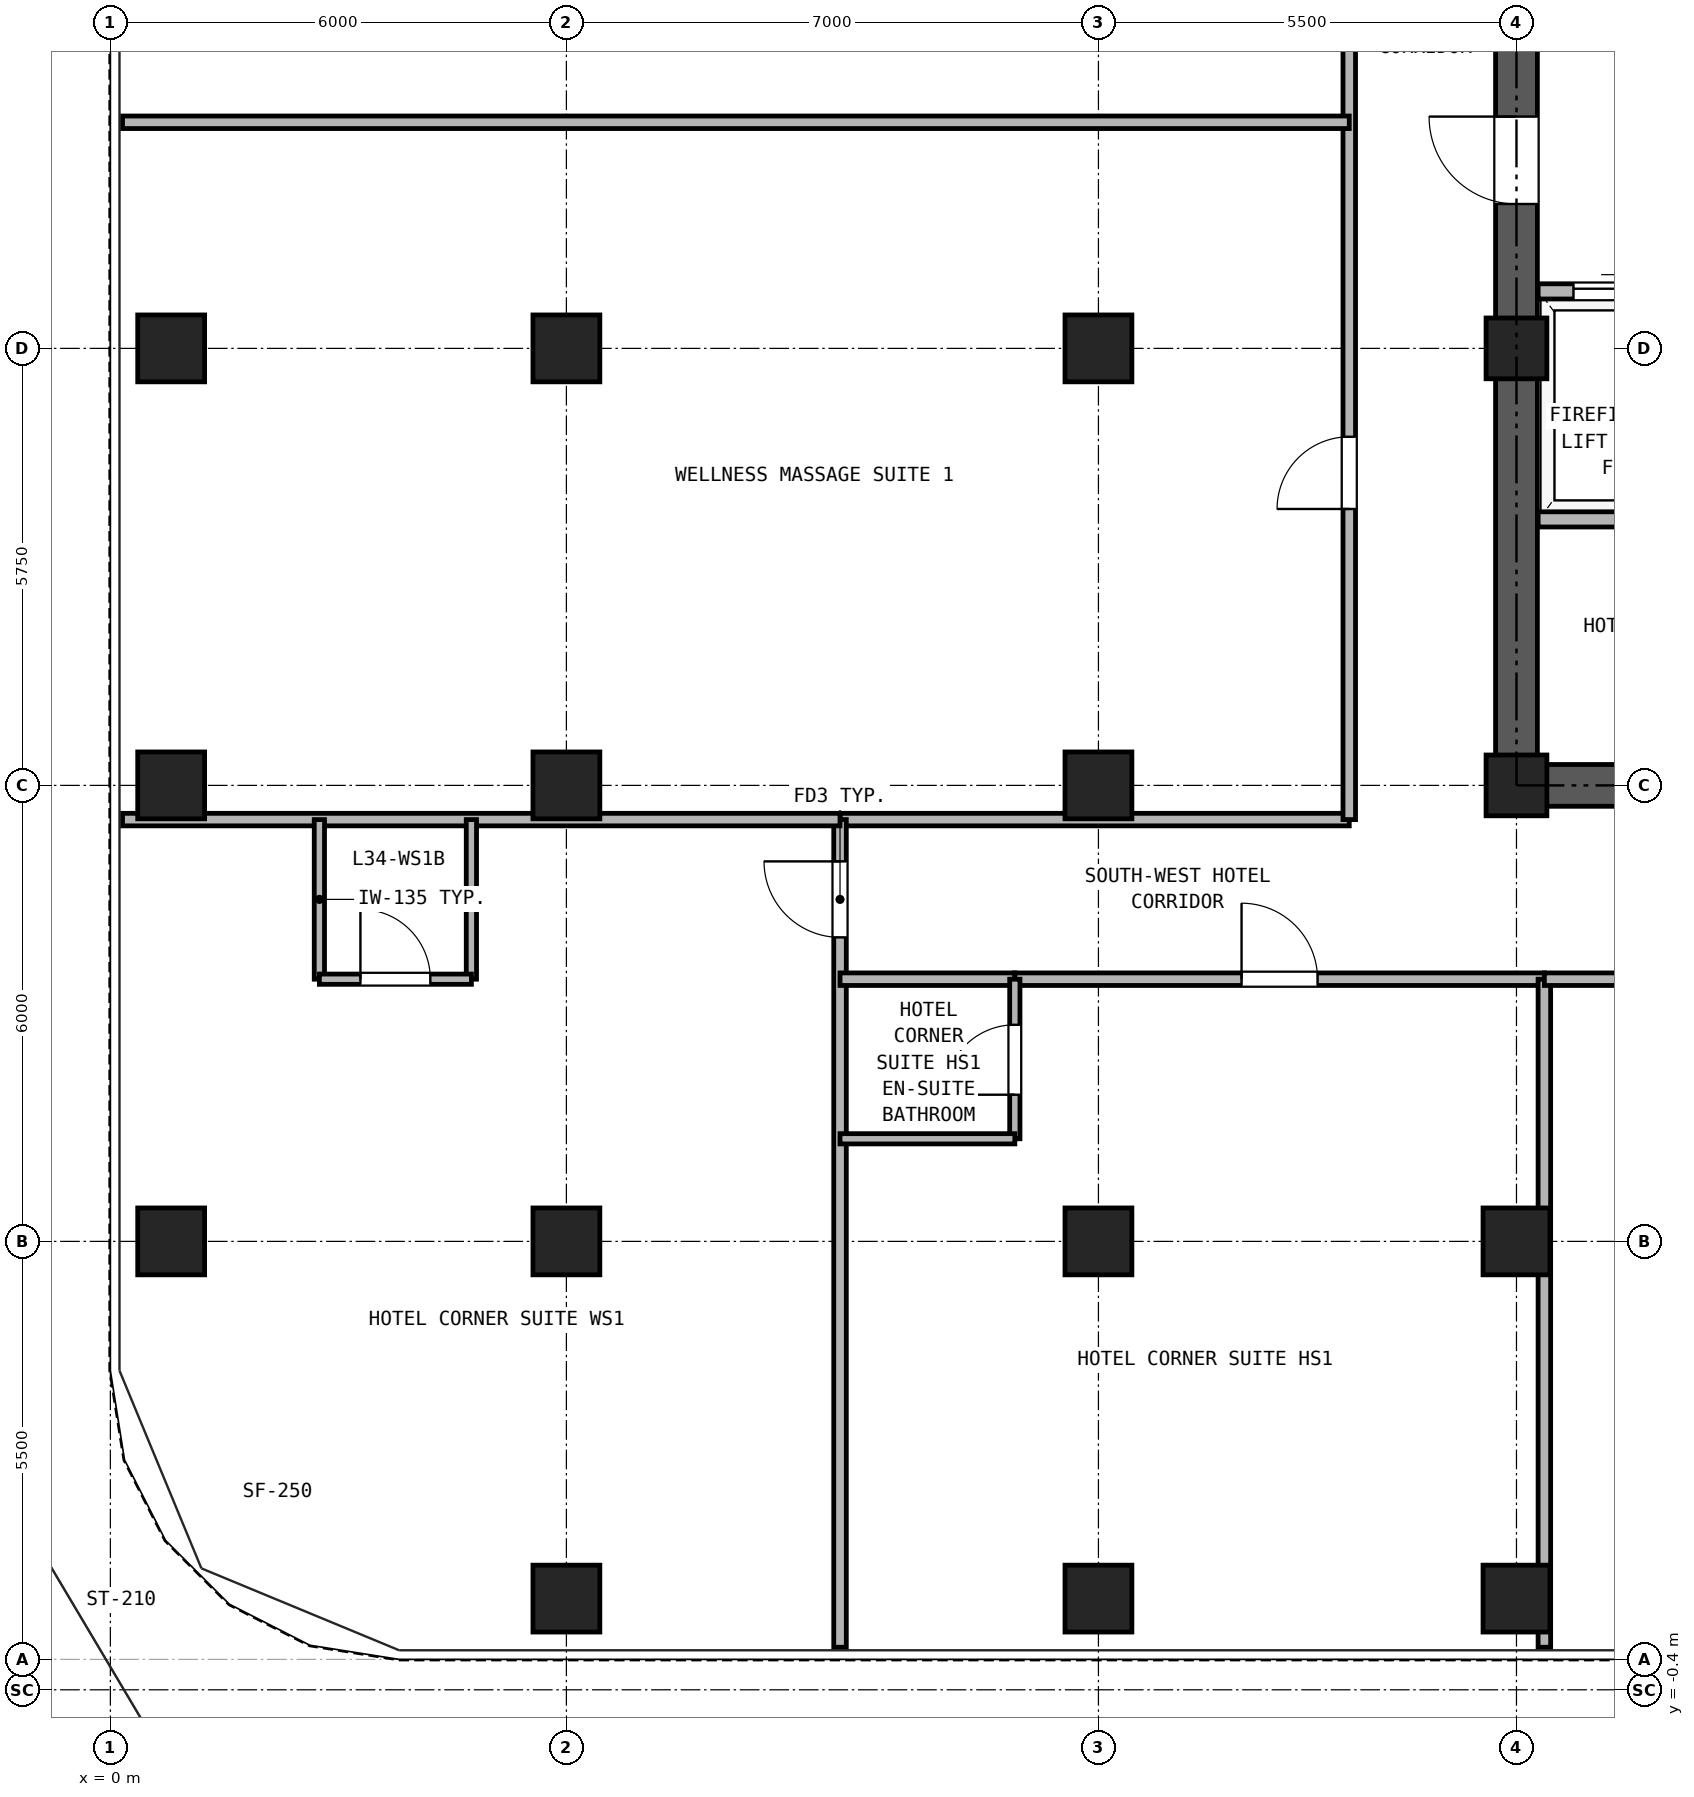
"""IFC4 building model, lengths in metres.
Left out: names, types, materials, properties, quantities, classifications, styles, units other than length and angle.
Written with IfcOpenShell. Run it as: python <this file> out.ifc"""

import sys

from ifc_helpers import new_model, si_unit, direction, frame, frame_2d, origin, origin_2d, place, context, subcontext, project, spatial, rectangle, hollow_rectangle, extrude, source, transform, mapped, element, fill, save


model = new_model("IFC4")
c1 = context("Model", 3, precision=1e-05, world=origin(), true_north=direction((0.0, 1.0)))
c2 = subcontext(c1, "Body", "Model", "MODEL_VIEW")
j1 = project(units=[si_unit("LENGTHUNIT", "METRE"), si_unit("PLANEANGLEUNIT", "RADIAN")], contexts=[c1])
p1 = place(None, origin())
s1 = spatial("IfcSite", under=j1, at=p1, CompositionType="ELEMENT")
p2 = place(p1, origin())
s2 = spatial("IfcBuilding", under=s1, at=p2, CompositionType="ELEMENT")
p3 = place(p2, frame((0.0, 0.0, 124.7)))
s3 = spatial("IfcBuildingStorey", under=s2, at=p3, CompositionType="ELEMENT", Elevation=124.7)
m1 = source(origin(), c2, "Body", "SweptSolid", [
    extrude(hollow_rectangle(XDim=0.88, YDim=0.88, WallThickness=0.05, at=origin_2d()), origin(), (0.0, 0.0, 1.0), 2.95),
])
for number, where, z_axis, x_axis in (
    (1, (6.0, 0.8, 0.0), (0.0, 0.0, 1.0), (1.0, 0.0, 0.0)),
    (2, (13.0, 0.8, 0.0), (0.0, 0.0, 1.0), (1.0, 0.0, 0.0)),
    (3, (18.5, 0.8, 0.0), (0.0, 0.0, 1.0), (1.0, 0.0, 0.0)),
    (4, (0.8, 5.5, 0.0), (0.0, 0.0, 1.0), (1.0, 0.0, 0.0)),
    (5, (0.8, 11.5, 0.0), (0.0, 0.0, 1.0), (1.0, 0.0, 0.0)),
    (6, (0.8, 17.25, 0.0), (0.0, 0.0, 1.0), (1.0, 0.0, 0.0)),
    (7, (6.0, 5.5, 0.0), (0.0, 0.0, 1.0), (1.0, 0.0, 0.0)),
    (8, (6.0, 11.5, 0.0), (0.0, 0.0, 1.0), (1.0, 0.0, 0.0)),
    (9, (6.0, 17.25, 0.0), (0.0, 0.0, 1.0), (1.0, 0.0, 0.0)),
    (10, (13.0, 5.5, 0.0), (0.0, 0.0, 1.0), (1.0, 0.0, 0.0)),
    (11, (13.0, 11.5, 0.0), (0.0, 0.0, 1.0), (1.0, 0.0, 0.0)),
    (12, (13.0, 17.25, 0.0), (0.0, 0.0, 1.0), (1.0, 0.0, 0.0)),
    (13, (18.5, 5.5, 0.0), (0.0, 0.0, 1.0), (1.0, 0.0, 0.0)),
):
    element("IfcColumn", number, at=place(p3, frame(where, z_axis=z_axis, x_axis=x_axis)), inside=s3, PredefinedType="COLUMN", context=c2, shape_type="MappedRepresentation", body=[
        mapped(m1, transform((0.0, 0.0, 0.0), x_axis=(1.0, 0.0, 0.0), y_axis=(0.0, 1.0, 0.0), z_axis=(0.0, 0.0, 1.0), scale=1.0)),
    ])
m2 = source(origin(), c2, "Body", "SweptSolid", [
    extrude(hollow_rectangle(XDim=0.8, YDim=0.8, WallThickness=0.045, at=origin_2d()), origin(), (0.0, 0.0, 1.0), 2.95),
])
for number, where, z_axis, x_axis in (
    (14, (18.5, 11.5, 0.0), (0.0, 0.0, 1.0), (1.0, 0.0, 0.0)),
    (15, (18.5, 17.25, 0.0), (0.0, 0.0, 1.0), (1.0, 0.0, 0.0)),
):
    element("IfcColumn", number, at=place(p3, frame(where, z_axis=z_axis, x_axis=x_axis)), inside=s3, PredefinedType="COLUMN", context=c2, shape_type="MappedRepresentation", body=[
        mapped(m2, transform((0.0, 0.0, 0.0), x_axis=(1.0, 0.0, 0.0), y_axis=(0.0, 1.0, 0.0), z_axis=(0.0, 0.0, 1.0), scale=1.0)),
    ])
p4 = place(p3, frame((18.225, 11.5, 0.0), z_axis=(0.0, 0.0, 1.0), x_axis=(1.0, 0.0, 0.0)))
e16 = element("IfcWall", 16, at=p4, inside=s3, PredefinedType="SHEAR", context=c2, shape_type="SweptSolid", body=[
    extrude(rectangle(XDim=10.55, YDim=0.55, at=frame_2d((5.275, 0.0))), origin(), (0.0, 0.0, 1.0), 2.95),
])
p5 = place(p4, frame((2.375, 0.0, 0.0)))
e17 = element("IfcOpeningElement", 17, at=p5, cuts=e16, PredefinedType="OPENING", context=c2, shape_type="SweptSolid", body=[
    extrude(rectangle(XDim=0.95, YDim=2.15, at=frame_2d((0.475, 1.075))), frame((0.0, 0.285, 0.0), z_axis=(0.0, -1.0, 0.0), x_axis=(1.0, 0.0, 0.0)), (0.0, 0.0, 1.0), 0.57),
])
p6 = place(p4, frame((5.875, 0.0, 0.0)))
e18 = element("IfcOpeningElement", 18, at=p6, cuts=e16, PredefinedType="OPENING", context=c2, shape_type="SweptSolid", body=[
    extrude(rectangle(XDim=1.1, YDim=2.25, at=frame_2d((0.55, 1.125))), frame((0.0, 0.285, 0.0), z_axis=(0.0, -1.0, 0.0), x_axis=(1.0, 0.0, 0.0)), (0.0, 0.0, 1.0), 0.57),
])
p7 = place(p4, frame((8.275, 0.0, 0.0)))
e19 = element("IfcOpeningElement", 19, at=p7, cuts=e16, PredefinedType="OPENING", context=c2, shape_type="SweptSolid", body=[
    extrude(rectangle(XDim=1.1, YDim=2.25, at=frame_2d((0.55, 1.125))), frame((0.0, 0.285, 0.0), z_axis=(0.0, -1.0, 0.0), x_axis=(1.0, 0.0, 0.0)), (0.0, 0.0, 1.0), 0.57),
])
p8 = place(p3, frame((18.5, 11.775, 0.0), z_axis=(0.0, 0.0, 1.0), x_axis=(0.0, 1.0, 0.0)))
e20 = element("IfcWall", 20, at=p8, inside=s3, PredefinedType="SHEAR", context=c2, shape_type="SweptSolid", body=[
    extrude(rectangle(XDim=16.7, YDim=0.55, at=frame_2d((8.35, 0.0))), origin(), (0.0, 0.0, 1.0), 2.95),
])
p9 = place(p8, frame((7.375, 0.0, 0.0)))
e21 = element("IfcOpeningElement", 21, at=p9, cuts=e20, PredefinedType="OPENING", context=c2, shape_type="SweptSolid", body=[
    extrude(rectangle(XDim=1.15, YDim=2.2, at=frame_2d((0.575, 1.1))), frame((0.0, 0.285, 0.0), z_axis=(0.0, -1.0, 0.0), x_axis=(1.0, 0.0, 0.0)), (0.0, 0.0, 1.0), 0.57),
])
p10 = place(p3, frame((18.785, 18.0, 0.0), z_axis=(0.0, 0.0, 1.0), x_axis=(1.0, 0.0, 0.0)))
e22 = element("IfcWall", 22, at=p10, inside=s3, PredefinedType="PARTITIONING", context=c2, shape_type="SweptSolid", body=[
    extrude(rectangle(XDim=9.43, YDim=0.2, at=frame_2d((4.715, 0.0))), origin(), (0.0, 0.0, 1.0), 2.95),
])
p11 = place(p10, frame((0.465, 0.0, 0.0)))
e23 = element("IfcOpeningElement", 23, at=p11, cuts=e22, PredefinedType="OPENING", context=c2, shape_type="SweptSolid", body=[
    extrude(rectangle(XDim=1.3, YDim=2.3, at=frame_2d((0.65, 1.15))), frame((0.0, 0.11, 0.0), z_axis=(0.0, -1.0, 0.0), x_axis=(1.0, 0.0, 0.0)), (0.0, 0.0, 1.0), 0.22),
])
p12 = place(p10, frame((2.565, 0.0, 0.0)))
e24 = element("IfcOpeningElement", 24, at=p12, cuts=e22, PredefinedType="OPENING", context=c2, shape_type="SweptSolid", body=[
    extrude(rectangle(XDim=1.3, YDim=2.3, at=frame_2d((0.65, 1.15))), frame((0.0, 0.11, 0.0), z_axis=(0.0, -1.0, 0.0), x_axis=(1.0, 0.0, 0.0)), (0.0, 0.0, 1.0), 0.22),
])
p13 = place(p10, frame((7.065, 0.0, 0.0)))
e25 = element("IfcOpeningElement", 25, at=p13, cuts=e22, PredefinedType="OPENING", context=c2, shape_type="SweptSolid", body=[
    extrude(rectangle(XDim=1.0, YDim=2.15, at=frame_2d((0.5, 1.075))), frame((0.0, 0.11, 0.0), z_axis=(0.0, -1.0, 0.0), x_axis=(1.0, 0.0, 0.0)), (0.0, 0.0, 1.0), 0.22),
])
p14 = place(p3, frame((18.785, 15.0, 0.0), z_axis=(0.0, 0.0, 1.0), x_axis=(1.0, 0.0, 0.0)))
e26 = element("IfcWall", 26, at=p14, inside=s3, PredefinedType="PARTITIONING", context=c2, shape_type="SweptSolid", body=[
    extrude(rectangle(XDim=9.43, YDim=0.2, at=frame_2d((4.715, 0.0))), origin(), (0.0, 0.0, 1.0), 2.95),
])
p15 = place(p3, frame((9.6, 11.05, 0.0), z_axis=(0.0, 0.0, 1.0), x_axis=(1.0, 0.0, 0.0)))
e27 = element("IfcWall", 27, at=p15, inside=s3, PredefinedType="PARTITIONING", context=c2, shape_type="SweptSolid", body=[
    extrude(rectangle(XDim=6.7, YDim=0.165, at=frame_2d((3.35, 0.0))), origin(), (0.0, 0.0, 1.0), 2.95),
])
p16 = place(p3, frame((16.3, 11.05, 0.0), z_axis=(0.0, 0.0, 1.0), x_axis=(0.0, 1.0, 0.0)))
e28 = element("IfcWall", 28, at=p16, inside=s3, PredefinedType="PARTITIONING", context=c2, shape_type="SweptSolid", body=[
    extrude(rectangle(XDim=18.35, YDim=0.165, at=frame_2d((9.175, 0.0))), origin(), (0.0, 0.0, 1.0), 2.95),
])
p17 = place(p16, frame((4.087, 0.0, 0.0)))
e29 = element("IfcOpeningElement", 29, at=p17, cuts=e28, PredefinedType="OPENING", context=c2, shape_type="SweptSolid", body=[
    extrude(rectangle(XDim=0.95, YDim=2.15, at=frame_2d((0.475, 1.075))), frame((0.0, 0.093, 0.0), z_axis=(0.0, -1.0, 0.0), x_axis=(1.0, 0.0, 0.0)), (0.0, 0.0, 1.0), 0.185),
])
p18 = place(p16, frame((13.262, 0.0, 0.0)))
e30 = element("IfcOpeningElement", 30, at=p18, cuts=e28, PredefinedType="OPENING", context=c2, shape_type="SweptSolid", body=[
    extrude(rectangle(XDim=0.95, YDim=2.15, at=frame_2d((0.475, 1.075))), frame((0.0, 0.093, 0.0), z_axis=(0.0, -1.0, 0.0), x_axis=(1.0, 0.0, 0.0)), (0.0, 0.0, 1.0), 0.185),
])
p19 = place(p3, frame((9.6, 0.16, 0.0), z_axis=(0.0, 0.0, 1.0), x_axis=(0.0, 1.0, 0.0)))
e31 = element("IfcWall", 31, at=p19, inside=s3, PredefinedType="PARTITIONING", context=c2, shape_type="SweptSolid", body=[
    extrude(rectangle(XDim=10.89, YDim=0.165, at=frame_2d((5.445, 0.0))), origin(), (0.0, 0.0, 1.0), 2.95),
])
p20 = place(p19, frame((9.34, 0.0, 0.0)))
e32 = element("IfcOpeningElement", 32, at=p20, cuts=e31, PredefinedType="OPENING", context=c2, shape_type="SweptSolid", body=[
    extrude(rectangle(XDim=1.0, YDim=2.15, at=frame_2d((0.5, 1.075))), frame((0.0, 0.093, 0.0), z_axis=(0.0, -1.0, 0.0), x_axis=(1.0, 0.0, 0.0)), (0.0, 0.0, 1.0), 0.185),
])
p21 = place(p3, frame((0.16, 11.05, 0.0), z_axis=(0.0, 0.0, 1.0), x_axis=(1.0, 0.0, 0.0)))
e33 = element("IfcWall", 33, at=p21, inside=s3, PredefinedType="PARTITIONING", context=c2, shape_type="SweptSolid", body=[
    extrude(rectangle(XDim=9.44, YDim=0.165, at=frame_2d((4.72, 0.0))), origin(), (0.0, 0.0, 1.0), 2.95),
])
for number, where, z_axis, x_axis in (
    (34, (2.75, 8.95, 0.0), (0.0, 0.0, 1.0), (0.0, 1.0, 0.0)),
    (35, (4.75, 8.95, 0.0), (0.0, 0.0, 1.0), (0.0, 1.0, 0.0)),
):
    element("IfcWall", number, at=place(p3, frame(where, z_axis=z_axis, x_axis=x_axis)), inside=s3, PredefinedType="PARTITIONING", context=c2, shape_type="SweptSolid", body=[
        extrude(rectangle(XDim=2.1, YDim=0.135, at=frame_2d((1.05, 0.0))), origin(), (0.0, 0.0, 1.0), 2.95),
    ])
p22 = place(p3, frame((2.75, 8.95, 0.0), z_axis=(0.0, 0.0, 1.0), x_axis=(1.0, 0.0, 0.0)))
e36 = element("IfcWall", 36, at=p22, inside=s3, PredefinedType="PARTITIONING", context=c2, shape_type="SweptSolid", body=[
    extrude(rectangle(XDim=2.0, YDim=0.135, at=frame_2d((1.0, 0.0))), origin(), (0.0, 0.0, 1.0), 2.95),
])
p23 = place(p22, frame((0.54, 0.0, 0.0)))
e37 = element("IfcOpeningElement", 37, at=p23, cuts=e36, PredefinedType="OPENING", context=c2, shape_type="SweptSolid", body=[
    extrude(rectangle(XDim=0.92, YDim=2.1, at=frame_2d((0.46, 1.05))), frame((0.0, 0.077, 0.0), z_axis=(0.0, -1.0, 0.0), x_axis=(1.0, 0.0, 0.0)), (0.0, 0.0, 1.0), 0.155),
])
p24 = place(p3, frame((9.6, 8.95, 0.0), z_axis=(0.0, 0.0, 1.0), x_axis=(1.0, 0.0, 0.0)))
e38 = element("IfcWall", 38, at=p24, inside=s3, PredefinedType="PARTITIONING", context=c2, shape_type="SweptSolid", body=[
    extrude(rectangle(XDim=2.3, YDim=0.165, at=frame_2d((1.15, 0.0))), origin(), (0.0, 0.0, 1.0), 2.95),
])
p25 = place(p3, frame((11.9, 8.95, 0.0), z_axis=(0.0, 0.0, 1.0), x_axis=(1.0, 0.0, 0.0)))
e39 = element("IfcWall", 39, at=p25, inside=s3, PredefinedType="PARTITIONING", context=c2, shape_type="SweptSolid", body=[
    extrude(rectangle(XDim=6.967, YDim=0.165, at=frame_2d((3.483, 0.0))), origin(), (0.0, 0.0, 1.0), 2.95),
])
p26 = place(p25, frame((2.983, 0.0, 0.0)))
e40 = element("IfcOpeningElement", 40, at=p26, cuts=e39, PredefinedType="OPENING", context=c2, shape_type="SweptSolid", body=[
    extrude(rectangle(XDim=1.0, YDim=2.15, at=frame_2d((0.5, 1.075))), frame((0.0, 0.093, 0.0), z_axis=(0.0, -1.0, 0.0), x_axis=(1.0, 0.0, 0.0)), (0.0, 0.0, 1.0), 0.185),
])
p27 = place(p3, frame((11.9, 6.85, 0.0), z_axis=(0.0, 0.0, 1.0), x_axis=(0.0, 1.0, 0.0)))
e41 = element("IfcWall", 41, at=p27, inside=s3, PredefinedType="PARTITIONING", context=c2, shape_type="SweptSolid", body=[
    extrude(rectangle(XDim=2.1, YDim=0.135, at=frame_2d((1.05, 0.0))), origin(), (0.0, 0.0, 1.0), 2.95),
])
p28 = place(p27, frame((0.58, 0.0, 0.0)))
e42 = element("IfcOpeningElement", 42, at=p28, cuts=e41, PredefinedType="OPENING", context=c2, shape_type="SweptSolid", body=[
    extrude(rectangle(XDim=0.92, YDim=2.1, at=frame_2d((0.46, 1.05))), frame((0.0, 0.077, 0.0), z_axis=(0.0, -1.0, 0.0), x_axis=(1.0, 0.0, 0.0)), (0.0, 0.0, 1.0), 0.155),
])
p29 = place(p3, frame((9.6, 6.85, 0.0), z_axis=(0.0, 0.0, 1.0), x_axis=(1.0, 0.0, 0.0)))
e43 = element("IfcWall", 43, at=p29, inside=s3, PredefinedType="PARTITIONING", context=c2, shape_type="SweptSolid", body=[
    extrude(rectangle(XDim=2.3, YDim=0.135, at=frame_2d((1.15, 0.0))), origin(), (0.0, 0.0, 1.0), 2.95),
])
p30 = place(p3, frame((18.867, 0.16, 0.0), z_axis=(0.0, 0.0, 1.0), x_axis=(0.0, 1.0, 0.0)))
e44 = element("IfcWall", 44, at=p30, inside=s3, PredefinedType="PARTITIONING", context=c2, shape_type="SweptSolid", body=[
    extrude(rectangle(XDim=8.79, YDim=0.165, at=frame_2d((4.395, 0.0))), origin(), (0.0, 0.0, 1.0), 2.95),
])
p31 = place(p3, frame((18.867, 8.95, 0.0), z_axis=(0.0, 0.0, 1.0), x_axis=(1.0, 0.0, 0.0)))
e45 = element("IfcWall", 45, at=p31, inside=s3, PredefinedType="PARTITIONING", context=c2, shape_type="SweptSolid", body=[
    extrude(rectangle(XDim=6.966, YDim=0.165, at=frame_2d((3.483, 0.0))), origin(), (0.0, 0.0, 1.0), 2.95),
])
p32 = place(p31, frame((2.983, 0.0, 0.0)))
e46 = element("IfcOpeningElement", 46, at=p32, cuts=e45, PredefinedType="OPENING", context=c2, shape_type="SweptSolid", body=[
    extrude(rectangle(XDim=1.0, YDim=2.15, at=frame_2d((0.5, 1.075))), frame((0.0, 0.093, 0.0), z_axis=(0.0, -1.0, 0.0), x_axis=(1.0, 0.0, 0.0)), (0.0, 0.0, 1.0), 0.185),
])
p33 = place(p3, frame((0.16, 20.225, 0.0), z_axis=(0.0, 0.0, 1.0), x_axis=(1.0, 0.0, 0.0)))
e47 = element("IfcWall", 47, at=p33, inside=s3, PredefinedType="PARTITIONING", context=c2, shape_type="SweptSolid", body=[
    extrude(rectangle(XDim=16.14, YDim=0.165, at=frame_2d((8.07, 0.0))), origin(), (0.0, 0.0, 1.0), 2.583),
])
p34 = place(p11, origin())
e48 = element("IfcDoor", 48, at=p34, inside=s3, OperationType="DOUBLE_DOOR_SLIDING", PredefinedType="DOOR", context=c2, shape_type="SweptSolid", body=[
    extrude(rectangle(XDim=1.3, YDim=2.3, at=frame_2d((0.65, 1.15))), frame((0.0, 0.025, 0.0), z_axis=(0.0, -1.0, 0.0), x_axis=(1.0, 0.0, 0.0)), (0.0, 0.0, 1.0), 0.05),
])
fill(e23, e48)
p35 = place(p9, frame((1.15, 0.0, 0.0), z_axis=(0.0, 0.0, 1.0), x_axis=(-1.0, 0.0, 0.0)))
e49 = element("IfcDoor", 49, at=p35, inside=s3, OperationType="SINGLE_SWING_RIGHT", PredefinedType="DOOR", context=c2, shape_type="SweptSolid", body=[
    extrude(rectangle(XDim=1.15, YDim=2.2, at=frame_2d((0.575, 1.1))), frame((0.0, 0.025, 0.0), z_axis=(0.0, -1.0, 0.0), x_axis=(1.0, 0.0, 0.0)), (0.0, 0.0, 1.0), 0.05),
])
fill(e21, e49)
p36 = place(p23, origin())
e50 = element("IfcDoor", 50, at=p36, inside=s3, OperationType="SINGLE_SWING_LEFT", PredefinedType="DOOR", context=c2, shape_type="SweptSolid", body=[
    extrude(rectangle(XDim=0.92, YDim=2.1, at=frame_2d((0.46, 1.05))), frame((0.0, 0.025, 0.0), z_axis=(0.0, -1.0, 0.0), x_axis=(1.0, 0.0, 0.0)), (0.0, 0.0, 1.0), 0.05),
])
fill(e37, e50)
p37 = place(p20, origin())
e51 = element("IfcDoor", 51, at=p37, inside=s3, OperationType="SINGLE_SWING_RIGHT", PredefinedType="DOOR", context=c2, shape_type="SweptSolid", body=[
    extrude(rectangle(XDim=1.0, YDim=2.15, at=frame_2d((0.5, 1.075))), frame((0.0, 0.025, 0.0), z_axis=(0.0, -1.0, 0.0), x_axis=(1.0, 0.0, 0.0)), (0.0, 0.0, 1.0), 0.05),
])
fill(e32, e51)
p38 = place(p28, frame((0.92, 0.0, 0.0), z_axis=(0.0, 0.0, 1.0), x_axis=(-1.0, 0.0, 0.0)))
e52 = element("IfcDoor", 52, at=p38, inside=s3, OperationType="SINGLE_SWING_LEFT", PredefinedType="DOOR", context=c2, shape_type="SweptSolid", body=[
    extrude(rectangle(XDim=0.92, YDim=2.1, at=frame_2d((0.46, 1.05))), frame((0.0, 0.025, 0.0), z_axis=(0.0, -1.0, 0.0), x_axis=(1.0, 0.0, 0.0)), (0.0, 0.0, 1.0), 0.05),
])
fill(e42, e52)
p39 = place(p26, frame((1.0, 0.0, 0.0), z_axis=(0.0, 0.0, 1.0), x_axis=(-1.0, 0.0, 0.0)))
e53 = element("IfcDoor", 53, at=p39, inside=s3, OperationType="SINGLE_SWING_LEFT", PredefinedType="DOOR", context=c2, shape_type="SweptSolid", body=[
    extrude(rectangle(XDim=1.0, YDim=2.15, at=frame_2d((0.5, 1.075))), frame((0.0, 0.025, 0.0), z_axis=(0.0, -1.0, 0.0), x_axis=(1.0, 0.0, 0.0)), (0.0, 0.0, 1.0), 0.05),
])
fill(e40, e53)
p40 = place(p17, frame((0.95, 0.0, 0.0), z_axis=(0.0, 0.0, 1.0), x_axis=(-1.0, 0.0, 0.0)))
e54 = element("IfcDoor", 54, at=p40, inside=s3, OperationType="SINGLE_SWING_LEFT", PredefinedType="DOOR", context=c2, shape_type="SweptSolid", body=[
    extrude(rectangle(XDim=0.95, YDim=2.15, at=frame_2d((0.475, 1.075))), frame((0.0, 0.025, 0.0), z_axis=(0.0, -1.0, 0.0), x_axis=(1.0, 0.0, 0.0)), (0.0, 0.0, 1.0), 0.05),
])
fill(e29, e54)
save(model, sys.argv[1])
